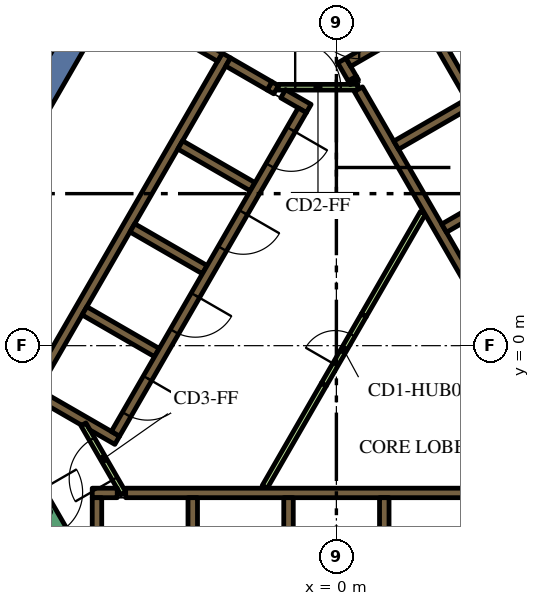
"""IFC4 building model, lengths in metres.
Left out: names, types, materials, properties, quantities, classifications, styles, units other than length and angle.
Written with IfcOpenShell. Run it as: python <this file> out.ifc"""

import sys

from ifc_helpers import new_model, si_unit, direction, frame, frame_2d, origin, place, context, subcontext, project, spatial, polyline, rectangle, outline, extrude, element, fill, save


model = new_model("IFC4")
c1 = context("Model", 3, precision=1e-05, world=origin(), true_north=direction((0.0, 1.0)))
c2 = subcontext(c1, "Body", "Model", "MODEL_VIEW")
j1 = project(units=[si_unit("LENGTHUNIT", "METRE"), si_unit("PLANEANGLEUNIT", "RADIAN")], contexts=[c1])
p1 = place(None, origin())
s1 = spatial("IfcSite", under=j1, at=p1, CompositionType="ELEMENT")
p2 = place(p1, origin())
s2 = spatial("IfcBuilding", under=s1, at=p2, CompositionType="ELEMENT")
p3 = place(p2, frame((0.0, 0.0, 231.0)))
s3 = spatial("IfcBuildingStorey", under=s2, at=p3, CompositionType="ELEMENT", Elevation=231.0)
p4 = place(p3, frame((8.235, 5.736, 0.0), z_axis=(0.0, 0.0, 1.0), x_axis=(-0.499983401189, 0.8660349869, 0.0)))
e1 = element("IfcWall", 1, at=p4, inside=s3, PredefinedType="SOLIDWALL", context=c2, shape_type="SweptSolid", body=[
    extrude(rectangle(XDim=12.472, YDim=0.7, at=frame_2d((6.236, 0.0))), origin(), (0.0, 0.0, 1.0), 4.2),
])
p5 = place(p3, frame((-12.625, -1.867, 0.0), z_axis=(0.0, 0.0, 1.0), x_axis=(0.500008520515, 0.866020484407, 0.0)))
e2 = element("IfcWall", 2, at=p5, inside=s3, PredefinedType="SOLIDWALL", context=c2, shape_type="SweptSolid", body=[
    extrude(rectangle(XDim=15.859, YDim=0.7, at=frame_2d((7.929, 0.0))), origin(), (0.0, 0.0, 1.0), 4.2),
])
p6 = place(p3, frame((-5.545, -3.875, 0.0), z_axis=(0.0, 0.0, 1.0), x_axis=(1.0, 0.0, 0.0)))
e3 = element("IfcWall", 3, at=p6, inside=s3, PredefinedType="SOLIDWALL", context=c2, shape_type="SweptSolid", body=[
    extrude(rectangle(XDim=11.97, YDim=0.25, at=frame_2d((5.985, 0.0))), origin(), (0.0, 0.0, 1.0), 4.2),
])
p7 = place(p3, frame((-6.425, -3.875, 0.0), z_axis=(0.0, 0.0, 1.0), x_axis=(1.0, 0.0, 0.0)))
e4 = element("IfcWall", 4, at=p7, inside=s3, PredefinedType="SOLIDWALL", context=c2, shape_type="SweptSolid", body=[
    extrude(rectangle(XDim=0.658, YDim=0.25, at=frame_2d((0.329, 0.0))), origin(), (0.0, 0.0, 1.0), 4.2),
])
for number, where, z_axis, x_axis in (
    (5, (1.26, -4.0, 0.0), (0.0, 0.0, 1.0), (0.0, -1.0, 0.0)),
    (6, (-1.26, -4.0, 0.0), (0.0, 0.0, 1.0), (0.0, -1.0, 0.0)),
    (7, (-3.78, -4.0, 0.0), (0.0, 0.0, 1.0), (0.0, -1.0, 0.0)),
):
    element("IfcWall", number, at=place(p3, frame(where, z_axis=z_axis, x_axis=x_axis)), inside=s3, PredefinedType="SOLIDWALL", context=c2, shape_type="SweptSolid", body=[
        extrude(rectangle(XDim=2.2, YDim=0.25, at=frame_2d((1.1, 0.0))), origin(), (0.0, 0.0, 1.0), 4.2),
    ])
p8 = place(p3, frame((-6.3, -7.125, 0.0), z_axis=(0.0, 0.0, 1.0), x_axis=(0.0, 1.0, 0.0)))
e8 = element("IfcWall", 8, at=p8, inside=s3, PredefinedType="SOLIDWALL", context=c2, shape_type="SweptSolid", body=[
    extrude(rectangle(XDim=3.125, YDim=0.25, at=frame_2d((1.562, 0.0))), origin(), (0.0, 0.0, 1.0), 4.2),
])
p9 = place(p3, frame((0.473, 6.93, 0.0), z_axis=(0.0, 0.0, 1.0), x_axis=(-0.49972245349, 0.866185586049, 0.0)))
e9 = element("IfcWall", 9, at=p9, inside=s3, PredefinedType="SOLIDWALL", context=c2, shape_type="SweptSolid", body=[
    extrude(rectangle(XDim=0.11, YDim=0.25, at=frame_2d((0.055, 0.0))), origin(), (0.0, 0.0, 1.0), 4.2),
])
p10 = place(p3, frame((6.568, -3.627, 0.0), z_axis=(0.0, 0.0, 1.0), x_axis=(-0.499999455981, 0.866025717874, 0.0)))
e10 = element("IfcWall", 10, at=p10, inside=s3, PredefinedType="SOLIDWALL", context=c2, shape_type="SweptSolid", body=[
    extrude(rectangle(XDim=11.978, YDim=0.25, at=frame_2d((5.989, 0.0))), origin(), (0.0, 0.0, 1.0), 4.2),
])
p11 = place(p3, frame((0.417, 7.027, 0.0), z_axis=(0.0, 0.0, 1.0), x_axis=(-0.500210807569, 0.865903659763, 0.0)))
e11 = element("IfcWall", 11, at=p11, inside=s3, PredefinedType="SOLIDWALL", context=c2, shape_type="SweptSolid", body=[
    extrude(rectangle(XDim=0.548, YDim=0.25, at=frame_2d((0.274, 0.0))), origin(), (0.0, 0.0, 1.0), 4.2),
])
p12 = place(p3, frame((3.1, 9.064, 0.0), z_axis=(0.0, 0.0, 1.0), x_axis=(-0.866030133475, -0.499991807846, 0.0)))
e12 = element("IfcWall", 12, at=p12, inside=s3, PredefinedType="SOLIDWALL", context=c2, shape_type="SweptSolid", body=[
    extrude(rectangle(XDim=3.217, YDim=0.25, at=frame_2d((1.608, 0.0))), origin(), (0.0, 0.0, 1.0), 4.2),
])
p13 = place(p3, frame((1.574, 5.274, 0.0), z_axis=(0.0, 0.0, 1.0), x_axis=(0.866028486751, 0.499994660107, 0.0)))
e13 = element("IfcWall", 13, at=p13, inside=s3, PredefinedType="SOLIDWALL", context=c2, shape_type="SweptSolid", body=[
    extrude(rectangle(XDim=2.2, YDim=0.25, at=frame_2d((1.1, 0.0))), origin(), (0.0, 0.0, 1.0), 4.2),
])
p14 = place(p3, frame((2.834, 3.091, 0.0), z_axis=(0.0, 0.0, 1.0), x_axis=(0.866008176907, 0.50002983664, 0.0)))
e14 = element("IfcWall", 14, at=p14, inside=s3, PredefinedType="SOLIDWALL", context=c2, shape_type="SweptSolid", body=[
    extrude(rectangle(XDim=2.2, YDim=0.25, at=frame_2d((1.1, 0.0))), origin(), (0.0, 0.0, 1.0), 4.2),
])
p15 = place(p3, frame((-8.06, -1.311, 0.0), z_axis=(0.0, 0.0, 1.0), x_axis=(0.50000273126, 0.866023826885, 0.0)))
e15 = element("IfcWall", 15, at=p15, inside=s3, PredefinedType="SOLIDWALL", context=c2, shape_type="SweptSolid", body=[
    extrude(rectangle(XDim=10.33, YDim=0.25, at=frame_2d((5.165, 0.0))), origin(), (0.0, 0.0, 1.0), 4.2),
])
p16 = place(p3, frame((-1.758, 6.835, 0.0), z_axis=(0.0, 0.0, 1.0), x_axis=(0.865982457891, -0.500074377092, 0.0)))
e16 = element("IfcWall", 16, at=p16, inside=s3, PredefinedType="SOLIDWALL", context=c2, shape_type="SweptSolid", body=[
    extrude(rectangle(XDim=0.2, YDim=0.25, at=frame_2d((0.1, 0.0))), origin(), (0.0, 0.0, 1.0), 4.2),
])
p17 = place(p3, frame((-1.76, 6.836, 0.0), z_axis=(0.0, 0.0, 1.0), x_axis=(-0.865952863304, 0.500125622755, 0.0)))
e17 = element("IfcWall", 17, at=p17, inside=s3, PredefinedType="SOLIDWALL", context=c2, shape_type="SweptSolid", body=[
    extrude(rectangle(XDim=1.258, YDim=0.25, at=frame_2d((0.629, 0.0))), origin(), (0.0, 0.0, 1.0), 4.2),
])
p18 = place(p3, frame((-0.728, 6.24, 0.0), z_axis=(0.0, 0.0, 1.0), x_axis=(-0.865955664968, 0.500120771724, 0.0)))
e18 = element("IfcWall", 18, at=p18, inside=s3, PredefinedType="SOLIDWALL", context=c2, shape_type="SweptSolid", body=[
    extrude(rectangle(XDim=0.778, YDim=0.25, at=frame_2d((0.389, 0.0))), origin(), (0.0, 0.0, 1.0), 4.2),
])
for number, where, z_axis, x_axis in (
    (19, (-2.204, 4.182, 0.0), (0.0, 0.0, 1.0), (-0.866, 0.5, 0.0)),
    (20, (-5.369, 3.1, 0.0), (0.0, 0.0, 1.0), (0.866, -0.5, 0.0)),
    (21, (-4.724, -0.182, 0.0), (0.0, 0.0, 1.0), (-0.866, 0.5, 0.0)),
):
    element("IfcWall", number, at=place(p3, frame(where, z_axis=z_axis, x_axis=x_axis)), inside=s3, PredefinedType="SOLIDWALL", context=c2, shape_type="SweptSolid", body=[
        extrude(rectangle(XDim=2.2, YDim=0.25, at=frame_2d((1.1, 0.0))), origin(), (0.0, 0.0, 1.0), 4.2),
    ])
p19 = place(p3, origin())
e22 = element("IfcWall", 22, at=p19, inside=s3, PredefinedType="SOLIDWALL", context=c2, shape_type="SweptSolid", body=[
    extrude(outline(polyline([(-5.922, -2.257), (-5.922, -2.257), (-5.705, -2.382), (-5.83, -2.598), (-6.483, -2.221), (-6.591, -2.033), (-6.591, -2.033), (-6.7, -2.096), (-7.952, -1.373), (-7.827, -1.156), (-5.922, -2.257)])), origin(), (0.0, 0.0, 1.0), 4.2),
])
p20 = place(p3, frame((-3.066, 7.59, 0.0), z_axis=(0.0, 0.0, 1.0), x_axis=(-0.866081358704, 0.49990307071, 0.0)))
e23 = element("IfcWall", 23, at=p20, inside=s3, PredefinedType="SOLIDWALL", context=c2, shape_type="SweptSolid", body=[
    extrude(rectangle(XDim=0.858, YDim=0.25, at=frame_2d((0.429, 0.0))), origin(), (0.0, 0.0, 1.0), 4.2),
])
p21 = place(p3, frame((-1.887, -3.718, 0.0), z_axis=(0.0, 0.0, 1.0), x_axis=(0.500043732237, 0.866000153493, 0.0)))
e24 = element("IfcWall", 24, at=p21, inside=s3, PredefinedType="PARTITIONING", context=c2, shape_type="SweptSolid", body=[
    extrude(rectangle(XDim=3.114, YDim=0.15, at=frame_2d((1.557, 0.0))), origin(), (0.0, 0.0, 1.0), 3.45),
])
p22 = place(p3, frame((0.72, 0.797, 0.0), z_axis=(0.0, 0.0, 1.0), x_axis=(0.499984921984, 0.866034108906, 0.0)))
e25 = element("IfcWall", 25, at=p22, inside=s3, PredefinedType="PARTITIONING", context=c2, shape_type="SweptSolid", body=[
    extrude(rectangle(XDim=3.113, YDim=0.15, at=frame_2d((1.557, 0.0))), origin(), (0.0, 0.0, 1.0), 3.45),
])
p23 = place(p3, frame((8.565, -2.185, 0.0), z_axis=(0.0, 0.0, 1.0), x_axis=(-0.499997954832, 0.866026584559, 0.0)))
e26 = element("IfcWall", 26, at=p23, inside=s3, PredefinedType="SOLIDWALL", context=c2, shape_type="SweptSolid", body=[
    extrude(rectangle(XDim=12.35, YDim=0.25, at=frame_2d((6.175, 0.0))), origin(), (0.0, 0.0, 1.0), 4.2),
])
p24 = place(p23, frame((0.585, 0.0, 0.0)))
e27 = element("IfcOpeningElement", 27, at=p24, cuts=e26, PredefinedType="OPENING", context=c2, shape_type="SweptSolid", body=[
    extrude(rectangle(XDim=1.1, YDim=2.1, at=frame_2d((0.55, 1.05))), frame((0.0, 0.135, 0.0), z_axis=(0.0, -1.0, 0.0), x_axis=(1.0, 0.0, 0.0)), (0.0, 0.0, 1.0), 0.27),
])
p25 = place(p3, frame((-0.898, 6.194, 0.0), z_axis=(0.0, 0.0, 1.0), x_axis=(-0.499996202215, -0.866027596426, 0.0)))
e28 = element("IfcWall", 28, at=p25, inside=s3, PredefinedType="SOLIDWALL", context=c2, shape_type="SweptSolid", body=[
    extrude(rectangle(XDim=9.83, YDim=0.25, at=frame_2d((4.915, 0.0))), origin(), (0.0, 0.0, 1.0), 4.2),
])
p26 = place(p25, frame((0.585, 0.0, 0.0)))
e29 = element("IfcOpeningElement", 29, at=p26, cuts=e28, PredefinedType="OPENING", context=c2, shape_type="SweptSolid", body=[
    extrude(rectangle(XDim=1.1, YDim=2.1, at=frame_2d((0.55, 1.05))), frame((0.0, 0.135, 0.0), z_axis=(0.0, -1.0, 0.0), x_axis=(1.0, 0.0, 0.0)), (0.0, 0.0, 1.0), 0.27),
])
p27 = place(p25, frame((3.105, 0.0, 0.0)))
e30 = element("IfcOpeningElement", 30, at=p27, cuts=e28, PredefinedType="OPENING", context=c2, shape_type="SweptSolid", body=[
    extrude(rectangle(XDim=1.1, YDim=2.1, at=frame_2d((0.55, 1.05))), frame((0.0, 0.135, 0.0), z_axis=(0.0, -1.0, 0.0), x_axis=(1.0, 0.0, 0.0)), (0.0, 0.0, 1.0), 0.27),
])
p28 = place(p25, frame((5.625, 0.0, 0.0)))
e31 = element("IfcOpeningElement", 31, at=p28, cuts=e28, PredefinedType="OPENING", context=c2, shape_type="SweptSolid", body=[
    extrude(rectangle(XDim=1.1, YDim=2.1, at=frame_2d((0.55, 1.05))), frame((0.0, 0.135, 0.0), z_axis=(0.0, -1.0, 0.0), x_axis=(1.0, 0.0, 0.0)), (0.0, 0.0, 1.0), 0.27),
])
p29 = place(p25, frame((8.145, 0.0, 0.0)))
e32 = element("IfcOpeningElement", 32, at=p29, cuts=e28, PredefinedType="OPENING", context=c2, shape_type="SweptSolid", body=[
    extrude(rectangle(XDim=1.1, YDim=2.1, at=frame_2d((0.55, 1.05))), frame((0.0, 0.135, 0.0), z_axis=(0.0, -1.0, 0.0), x_axis=(1.0, 0.0, 0.0)), (0.0, 0.0, 1.0), 0.27),
])
p30 = place(p3, frame((-8.103, -3.466, 0.0), z_axis=(0.0, 0.0, 1.0), x_axis=(0.500078061341, -0.865980330357, 0.0)))
e33 = element("IfcWall", 33, at=p30, inside=s3, PredefinedType="SOLIDWALL", context=c2, shape_type="SweptSolid", body=[
    extrude(rectangle(XDim=2.1, YDim=0.4, at=frame_2d((1.05, 0.0))), origin(), (0.0, 0.0, 1.0), 4.2),
])
p31 = place(p30, frame((0.45, 0.0, 0.0)))
e34 = element("IfcOpeningElement", 34, at=p31, cuts=e33, PredefinedType="OPENING", context=c2, shape_type="SweptSolid", body=[
    extrude(rectangle(XDim=1.2, YDim=2.1, at=frame_2d((0.6, 1.05))), frame((0.0, 0.21, 0.0), z_axis=(0.0, -1.0, 0.0), x_axis=(1.0, 0.0, 0.0)), (0.0, 0.0, 1.0), 0.42),
])
p32 = place(p3, frame((-0.33, -1.022, 0.0), z_axis=(0.0, 0.0, 1.0), x_axis=(0.500027713859, 0.866009402589, 0.0)))
e35 = element("IfcWall", 35, at=p32, inside=s3, PredefinedType="PARTITIONING", context=c2, shape_type="SweptSolid", body=[
    extrude(rectangle(XDim=2.1, YDim=0.15, at=frame_2d((1.05, 0.0))), origin(), (0.0, 0.0, 1.0), 3.45),
])
p33 = place(p32, frame((0.6, 0.0, 0.0)))
e36 = element("IfcOpeningElement", 36, at=p33, cuts=e35, PredefinedType="OPENING", context=c2, shape_type="SweptSolid", body=[
    extrude(rectangle(XDim=0.9, YDim=2.1, at=frame_2d((0.45, 1.05))), frame((0.0, 0.085, 0.0), z_axis=(0.0, -1.0, 0.0), x_axis=(1.0, 0.0, 0.0)), (0.0, 0.0, 1.0), 0.17),
])
p34 = place(p3, frame((-1.534, 6.8, 0.0), z_axis=(0.0, 0.0, 1.0), x_axis=(1.0, 0.0, 0.0)))
e37 = element("IfcWall", 37, at=p34, inside=s3, PredefinedType="PARTITIONING", context=c2, shape_type="SweptSolid", body=[
    extrude(rectangle(XDim=2.1, YDim=0.15, at=frame_2d((1.05, 0.0))), origin(), (0.0, 0.0, 1.0), 3.45),
])
p35 = place(p34, frame((0.45, 0.0, 0.0)))
e38 = element("IfcOpeningElement", 38, at=p35, cuts=e37, PredefinedType="OPENING", context=c2, shape_type="SweptSolid", body=[
    extrude(rectangle(XDim=1.2, YDim=2.1, at=frame_2d((0.6, 1.05))), frame((0.0, 0.085, 0.0), z_axis=(0.0, -1.0, 0.0), x_axis=(1.0, 0.0, 0.0)), (0.0, 0.0, 1.0), 0.17),
])
p36 = place(p3, frame((-5.606, -3.89, 0.0), z_axis=(0.0, 0.0, 1.0), x_axis=(-0.500027713859, 0.866009402589, 0.0)))
e39 = element("IfcWall", 39, at=p36, inside=s3, PredefinedType="PARTITIONING", context=c2, shape_type="SweptSolid", body=[
    extrude(rectangle(XDim=2.1, YDim=0.15, at=frame_2d((1.05, 0.0))), origin(), (0.0, 0.0, 1.0), 3.45),
])
p37 = place(p36, frame((0.45, 0.0, 0.0)))
e40 = element("IfcOpeningElement", 40, at=p37, cuts=e39, PredefinedType="OPENING", context=c2, shape_type="SweptSolid", body=[
    extrude(rectangle(XDim=1.2, YDim=2.1, at=frame_2d((0.6, 1.05))), frame((0.0, 0.085, 0.0), z_axis=(0.0, -1.0, 0.0), x_axis=(1.0, 0.0, 0.0)), (0.0, 0.0, 1.0), 0.17),
])
p38 = place(p3, frame((-7.061, 15.069, 0.0), z_axis=(0.0, 0.0, 1.0), x_axis=(-0.500008127286, -0.866020711443, 0.0)))
e41 = element("IfcWall", 41, at=p38, inside=s3, PredefinedType="PARTITIONING", context=c2, shape_type="SweptSolid", body=[
    extrude(rectangle(XDim=9.42, YDim=0.2, at=frame_2d((4.71, 0.0))), origin(), (0.0, 0.0, 1.0), 3.45),
])
p39 = place(p38, frame((4.2, 0.0, 0.0)))
e42 = element("IfcOpeningElement", 42, at=p39, cuts=e41, PredefinedType="OPENING", context=c2, shape_type="SweptSolid", body=[
    extrude(rectangle(XDim=1.0, YDim=2.1, at=frame_2d((0.5, 1.05))), frame((0.0, 0.11, 0.0), z_axis=(0.0, -1.0, 0.0), x_axis=(1.0, 0.0, 0.0)), (0.0, 0.0, 1.0), 0.22),
])
p40 = place(p26, origin())
e43 = element("IfcDoor", 43, at=p40, inside=s3, OperationType="DOUBLE_DOOR_SLIDING", PredefinedType="DOOR", context=c2, shape_type="SweptSolid", body=[
    extrude(rectangle(XDim=1.1, YDim=2.1, at=frame_2d((0.55, 1.05))), frame((0.0, 0.025, 0.0), z_axis=(0.0, -1.0, 0.0), x_axis=(1.0, 0.0, 0.0)), (0.0, 0.0, 1.0), 0.05),
])
fill(e29, e43)
p41 = place(p27, origin())
e44 = element("IfcDoor", 44, at=p41, inside=s3, OperationType="DOUBLE_DOOR_SLIDING", PredefinedType="DOOR", context=c2, shape_type="SweptSolid", body=[
    extrude(rectangle(XDim=1.1, YDim=2.1, at=frame_2d((0.55, 1.05))), frame((0.0, 0.025, 0.0), z_axis=(0.0, -1.0, 0.0), x_axis=(1.0, 0.0, 0.0)), (0.0, 0.0, 1.0), 0.05),
])
fill(e30, e44)
p42 = place(p28, origin())
e45 = element("IfcDoor", 45, at=p42, inside=s3, OperationType="DOUBLE_DOOR_SLIDING", PredefinedType="DOOR", context=c2, shape_type="SweptSolid", body=[
    extrude(rectangle(XDim=1.1, YDim=2.1, at=frame_2d((0.55, 1.05))), frame((0.0, 0.025, 0.0), z_axis=(0.0, -1.0, 0.0), x_axis=(1.0, 0.0, 0.0)), (0.0, 0.0, 1.0), 0.05),
])
fill(e31, e45)
p43 = place(p29, origin())
e46 = element("IfcDoor", 46, at=p43, inside=s3, OperationType="DOUBLE_DOOR_SLIDING", PredefinedType="DOOR", context=c2, shape_type="SweptSolid", body=[
    extrude(rectangle(XDim=1.1, YDim=2.1, at=frame_2d((0.55, 1.05))), frame((0.0, 0.025, 0.0), z_axis=(0.0, -1.0, 0.0), x_axis=(1.0, 0.0, 0.0)), (0.0, 0.0, 1.0), 0.05),
])
fill(e32, e46)
p44 = place(p31, origin())
e47 = element("IfcDoor", 47, at=p44, inside=s3, OperationType="SINGLE_SWING_LEFT", PredefinedType="DOOR", context=c2, shape_type="SweptSolid", body=[
    extrude(rectangle(XDim=1.2, YDim=2.1, at=frame_2d((0.6, 1.05))), frame((0.0, 0.025, 0.0), z_axis=(0.0, -1.0, 0.0), x_axis=(1.0, 0.0, 0.0)), (0.0, 0.0, 1.0), 0.05),
])
fill(e34, e47)
p45 = place(p33, origin())
e48 = element("IfcDoor", 48, at=p45, inside=s3, OperationType="SINGLE_SWING_LEFT", PredefinedType="DOOR", context=c2, shape_type="SweptSolid", body=[
    extrude(rectangle(XDim=0.9, YDim=2.1, at=frame_2d((0.45, 1.05))), frame((0.0, 0.025, 0.0), z_axis=(0.0, -1.0, 0.0), x_axis=(1.0, 0.0, 0.0)), (0.0, 0.0, 1.0), 0.05),
])
fill(e36, e48)
p46 = place(p35, origin())
e49 = element("IfcDoor", 49, at=p46, inside=s3, OperationType="SINGLE_SWING_LEFT", PredefinedType="DOOR", context=c2, shape_type="SweptSolid", body=[
    extrude(rectangle(XDim=1.2, YDim=2.1, at=frame_2d((0.6, 1.05))), frame((0.0, 0.025, 0.0), z_axis=(0.0, -1.0, 0.0), x_axis=(1.0, 0.0, 0.0)), (0.0, 0.0, 1.0), 0.05),
])
fill(e38, e49)
p47 = place(p37, origin())
e50 = element("IfcDoor", 50, at=p47, inside=s3, OperationType="SINGLE_SWING_LEFT", PredefinedType="DOOR", context=c2, shape_type="SweptSolid", body=[
    extrude(rectangle(XDim=1.2, YDim=2.1, at=frame_2d((0.6, 1.05))), frame((0.0, 0.025, 0.0), z_axis=(0.0, -1.0, 0.0), x_axis=(1.0, 0.0, 0.0)), (0.0, 0.0, 1.0), 0.05),
])
fill(e40, e50)
save(model, sys.argv[1])
